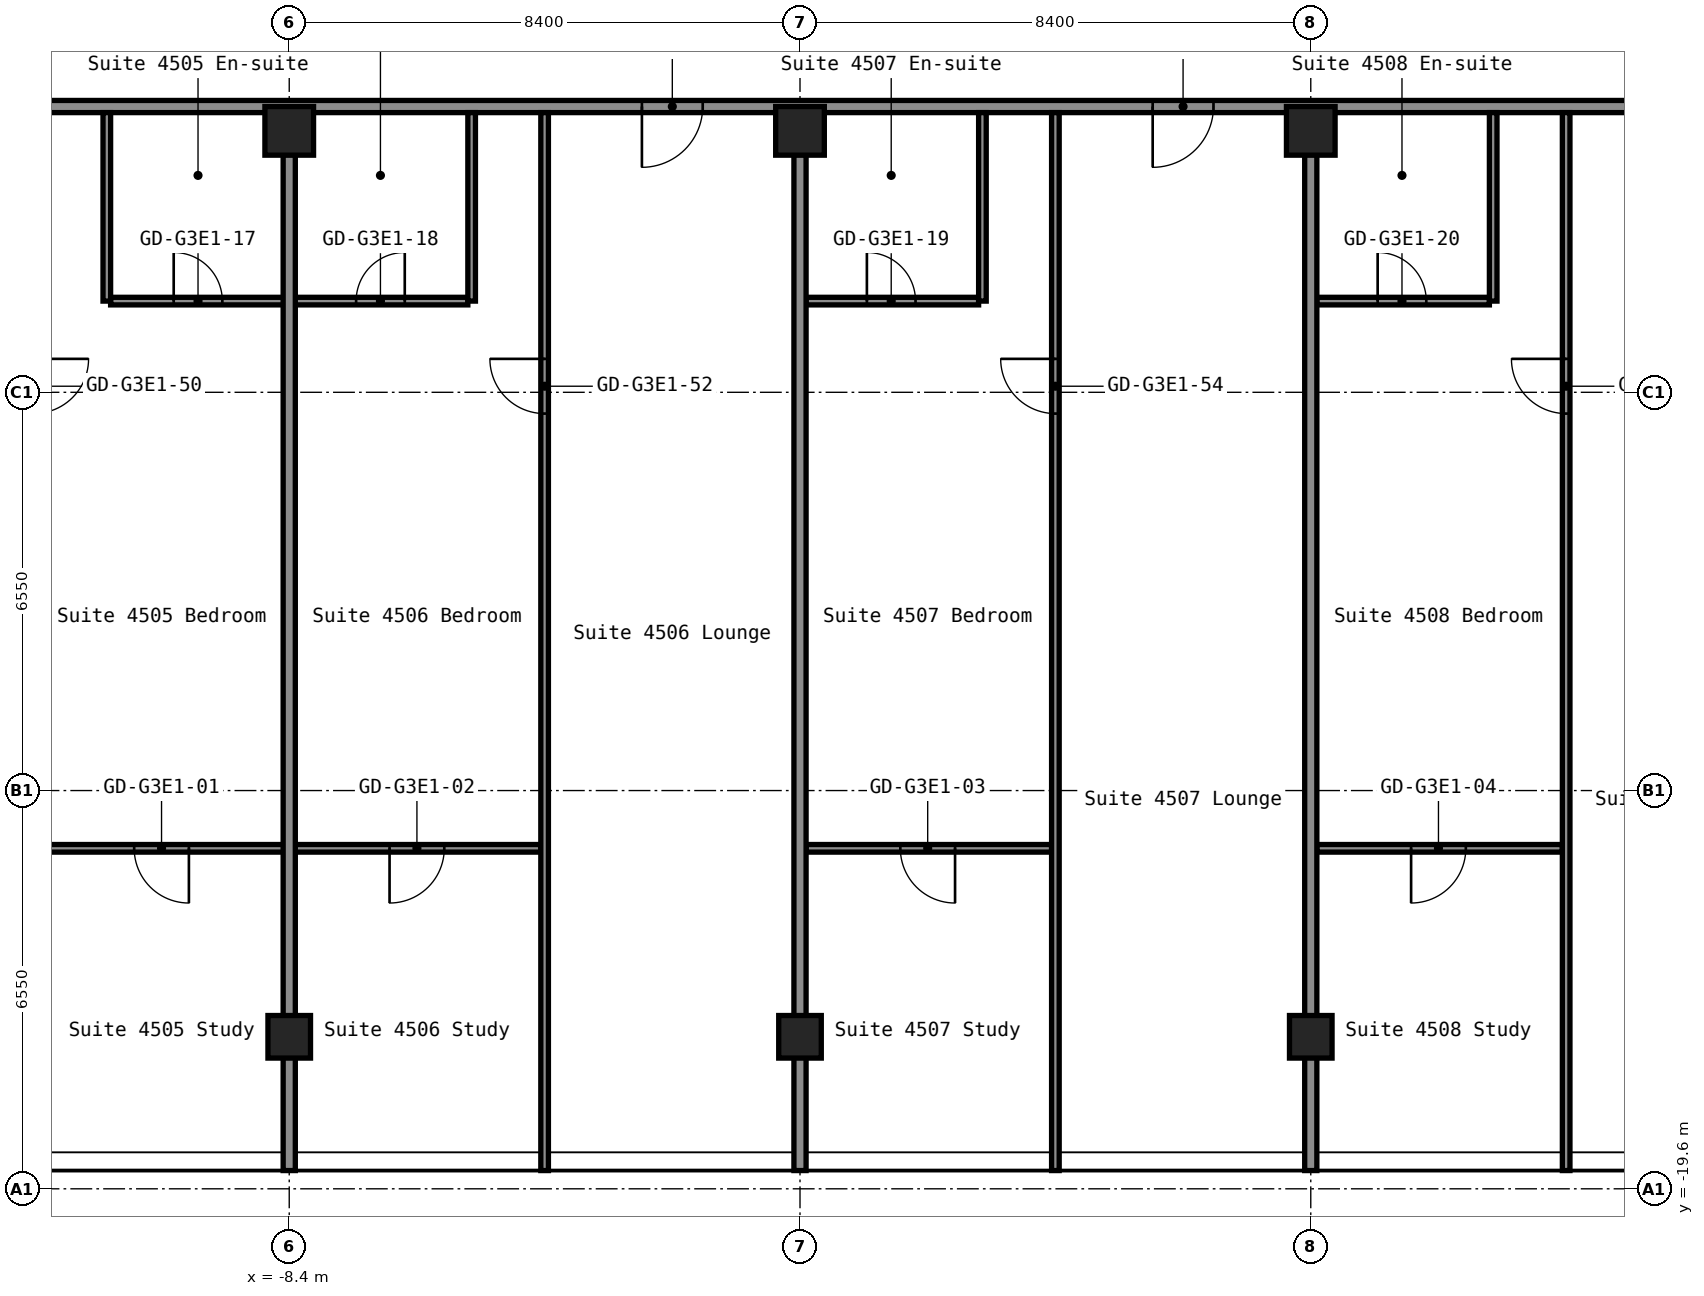
"""IFC4 building model, lengths in metres.
Left out: names, types, materials, properties, quantities, classifications, styles, units other than length and angle.
Written with IfcOpenShell. Run it as: python <this file> out.ifc"""

import sys

from ifc_helpers import new_model, si_unit, direction, frame, frame_2d, origin, origin_2d, place, context, subcontext, project, spatial, rectangle, hollow_rectangle, extrude, element, fill, save


model = new_model("IFC4")
c1 = context("Model", 3, precision=1e-05, world=origin(), true_north=direction((0.0, 1.0)))
c2 = subcontext(c1, "Body", "Model", "MODEL_VIEW")
j1 = project(units=[si_unit("LENGTHUNIT", "METRE"), si_unit("PLANEANGLEUNIT", "RADIAN")], contexts=[c1])
p1 = place(None, origin())
s1 = spatial("IfcSite", under=j1, at=p1, CompositionType="ELEMENT")
p2 = place(p1, origin())
s2 = spatial("IfcBuilding", under=s1, at=p2, CompositionType="ELEMENT")
p3 = place(p2, frame((0.0, 0.0, 159.8)))
s3 = spatial("IfcBuildingStorey", under=s2, at=p3, CompositionType="ELEMENT", Elevation=159.8)
p4 = place(p3, frame((-8.4, -17.1, 0.0), z_axis=(0.0, 0.0, 1.0), x_axis=(1.0, 0.0, 0.0)))
e1 = element("IfcColumn", 1, at=p4, inside=s3, PredefinedType="COLUMN", context=c2, shape_type="SweptSolid", body=[
    extrude(hollow_rectangle(XDim=0.7, YDim=0.7, WallThickness=0.028, at=origin_2d()), origin(), (0.0, 0.0, 1.0), 2.75),
])
p5 = place(p3, frame((-8.4, -2.2, 0.0), z_axis=(0.0, 0.0, 1.0), x_axis=(1.0, 0.0, 0.0)))
e2 = element("IfcColumn", 2, at=p5, inside=s3, PredefinedType="COLUMN", context=c2, shape_type="SweptSolid", body=[
    extrude(hollow_rectangle(XDim=0.8, YDim=0.8, WallThickness=0.032, at=origin_2d()), origin(), (0.0, 0.0, 1.0), 2.75),
])
p6 = place(p3, frame((0.0, -17.1, 0.0), z_axis=(0.0, 0.0, 1.0), x_axis=(1.0, 0.0, 0.0)))
e3 = element("IfcColumn", 3, at=p6, inside=s3, PredefinedType="COLUMN", context=c2, shape_type="SweptSolid", body=[
    extrude(hollow_rectangle(XDim=0.7, YDim=0.7, WallThickness=0.028, at=origin_2d()), origin(), (0.0, 0.0, 1.0), 2.75),
])
p7 = place(p3, frame((0.0, -2.2, 0.0), z_axis=(0.0, 0.0, 1.0), x_axis=(1.0, 0.0, 0.0)))
e4 = element("IfcColumn", 4, at=p7, inside=s3, PredefinedType="COLUMN", context=c2, shape_type="SweptSolid", body=[
    extrude(hollow_rectangle(XDim=0.8, YDim=0.8, WallThickness=0.032, at=origin_2d()), origin(), (0.0, 0.0, 1.0), 2.75),
])
p8 = place(p3, frame((8.4, -17.1, 0.0), z_axis=(0.0, 0.0, 1.0), x_axis=(1.0, 0.0, 0.0)))
e5 = element("IfcColumn", 5, at=p8, inside=s3, PredefinedType="COLUMN", context=c2, shape_type="SweptSolid", body=[
    extrude(hollow_rectangle(XDim=0.7, YDim=0.7, WallThickness=0.028, at=origin_2d()), origin(), (0.0, 0.0, 1.0), 2.75),
])
p9 = place(p3, frame((8.4, -2.2, 0.0), z_axis=(0.0, 0.0, 1.0), x_axis=(1.0, 0.0, 0.0)))
e6 = element("IfcColumn", 6, at=p9, inside=s3, PredefinedType="COLUMN", context=c2, shape_type="SweptSolid", body=[
    extrude(hollow_rectangle(XDim=0.8, YDim=0.8, WallThickness=0.032, at=origin_2d()), origin(), (0.0, 0.0, 1.0), 2.75),
])
p10 = place(p3, frame((-12.538, -14.0, 0.0), z_axis=(0.0, 0.0, 1.0), x_axis=(1.0, 0.0, 0.0)))
e7 = element("IfcWall", 7, at=p10, inside=s3, PredefinedType="PARTITIONING", context=c2, shape_type="SweptSolid", body=[
    extrude(rectangle(XDim=8.275, YDim=0.125, at=frame_2d((4.138, 0.0))), origin(), (0.0, 0.0, 1.0), 2.75),
])
p11 = place(p10, frame((1.587, 0.0, 0.0)))
e8 = element("IfcOpeningElement", 8, at=p11, cuts=e7, PredefinedType="OPENING", context=c2, shape_type="SweptSolid", body=[
    extrude(rectangle(XDim=0.9, YDim=2.1, at=frame_2d((0.45, 1.05))), frame((0.0, 0.073, 0.0), z_axis=(0.0, -1.0, 0.0), x_axis=(1.0, 0.0, 0.0)), (0.0, 0.0, 1.0), 0.145),
])
p12 = place(p10, frame((5.788, 0.0, 0.0)))
e9 = element("IfcOpeningElement", 9, at=p12, cuts=e7, PredefinedType="OPENING", context=c2, shape_type="SweptSolid", body=[
    extrude(rectangle(XDim=0.9, YDim=2.1, at=frame_2d((0.45, 1.05))), frame((0.0, 0.073, 0.0), z_axis=(0.0, -1.0, 0.0), x_axis=(1.0, 0.0, 0.0)), (0.0, 0.0, 1.0), 0.145),
])
p13 = place(p3, frame((0.1, -14.0, 0.0), z_axis=(0.0, 0.0, 1.0), x_axis=(1.0, 0.0, 0.0)))
e10 = element("IfcWall", 10, at=p13, inside=s3, PredefinedType="PARTITIONING", context=c2, shape_type="SweptSolid", body=[
    extrude(rectangle(XDim=4.037, YDim=0.125, at=frame_2d((2.019, 0.0))), origin(), (0.0, 0.0, 1.0), 2.75),
])
p14 = place(p13, frame((1.55, 0.0, 0.0)))
e11 = element("IfcOpeningElement", 11, at=p14, cuts=e10, PredefinedType="OPENING", context=c2, shape_type="SweptSolid", body=[
    extrude(rectangle(XDim=0.9, YDim=2.1, at=frame_2d((0.45, 1.05))), frame((0.0, 0.073, 0.0), z_axis=(0.0, -1.0, 0.0), x_axis=(1.0, 0.0, 0.0)), (0.0, 0.0, 1.0), 0.145),
])
p15 = place(p3, frame((8.5, -14.0, 0.0), z_axis=(0.0, 0.0, 1.0), x_axis=(1.0, 0.0, 0.0)))
e12 = element("IfcWall", 12, at=p15, inside=s3, PredefinedType="PARTITIONING", context=c2, shape_type="SweptSolid", body=[
    extrude(rectangle(XDim=4.038, YDim=0.125, at=frame_2d((2.019, 0.0))), origin(), (0.0, 0.0, 1.0), 2.75),
])
p16 = place(p15, frame((1.55, 0.0, 0.0)))
e13 = element("IfcOpeningElement", 13, at=p16, cuts=e12, PredefinedType="OPENING", context=c2, shape_type="SweptSolid", body=[
    extrude(rectangle(XDim=0.9, YDim=2.1, at=frame_2d((0.45, 1.05))), frame((0.0, 0.073, 0.0), z_axis=(0.0, -1.0, 0.0), x_axis=(1.0, 0.0, 0.0)), (0.0, 0.0, 1.0), 0.145),
])
p17 = place(p3, frame((-11.337, -5.0, 0.0), z_axis=(0.0, 0.0, 1.0), x_axis=(1.0, 0.0, 0.0)))
e14 = element("IfcWall", 14, at=p17, inside=s3, PredefinedType="PARTITIONING", context=c2, shape_type="SweptSolid", body=[
    extrude(rectangle(XDim=5.875, YDim=0.125, at=frame_2d((2.938, 0.0))), origin(), (0.0, 0.0, 1.0), 2.75),
])
p18 = place(p17, frame((1.038, 0.0, 0.0)))
e15 = element("IfcOpeningElement", 15, at=p18, cuts=e14, PredefinedType="OPENING", context=c2, shape_type="SweptSolid", body=[
    extrude(rectangle(XDim=0.8, YDim=2.1, at=frame_2d((0.4, 1.05))), frame((0.0, 0.073, 0.0), z_axis=(0.0, -1.0, 0.0), x_axis=(1.0, 0.0, 0.0)), (0.0, 0.0, 1.0), 0.145),
])
p19 = place(p17, frame((4.038, 0.0, 0.0)))
e16 = element("IfcOpeningElement", 16, at=p19, cuts=e14, PredefinedType="OPENING", context=c2, shape_type="SweptSolid", body=[
    extrude(rectangle(XDim=0.8, YDim=2.1, at=frame_2d((0.4, 1.05))), frame((0.0, 0.073, 0.0), z_axis=(0.0, -1.0, 0.0), x_axis=(1.0, 0.0, 0.0)), (0.0, 0.0, 1.0), 0.145),
])
p20 = place(p3, frame((0.1, -5.0, 0.0), z_axis=(0.0, 0.0, 1.0), x_axis=(1.0, 0.0, 0.0)))
e17 = element("IfcWall", 17, at=p20, inside=s3, PredefinedType="PARTITIONING", context=c2, shape_type="SweptSolid", body=[
    extrude(rectangle(XDim=2.837, YDim=0.125, at=frame_2d((1.419, 0.0))), origin(), (0.0, 0.0, 1.0), 2.75),
])
p21 = place(p20, frame((1.0, 0.0, 0.0)))
e18 = element("IfcOpeningElement", 18, at=p21, cuts=e17, PredefinedType="OPENING", context=c2, shape_type="SweptSolid", body=[
    extrude(rectangle(XDim=0.8, YDim=2.1, at=frame_2d((0.4, 1.05))), frame((0.0, 0.073, 0.0), z_axis=(0.0, -1.0, 0.0), x_axis=(1.0, 0.0, 0.0)), (0.0, 0.0, 1.0), 0.145),
])
p22 = place(p3, frame((8.5, -5.0, 0.0), z_axis=(0.0, 0.0, 1.0), x_axis=(1.0, 0.0, 0.0)))
e19 = element("IfcWall", 19, at=p22, inside=s3, PredefinedType="PARTITIONING", context=c2, shape_type="SweptSolid", body=[
    extrude(rectangle(XDim=2.837, YDim=0.125, at=frame_2d((1.419, 0.0))), origin(), (0.0, 0.0, 1.0), 2.75),
])
p23 = place(p22, frame((1.0, 0.0, 0.0)))
e20 = element("IfcOpeningElement", 20, at=p23, cuts=e19, PredefinedType="OPENING", context=c2, shape_type="SweptSolid", body=[
    extrude(rectangle(XDim=0.8, YDim=2.1, at=frame_2d((0.4, 1.05))), frame((0.0, 0.073, 0.0), z_axis=(0.0, -1.0, 0.0), x_axis=(1.0, 0.0, 0.0)), (0.0, 0.0, 1.0), 0.145),
])
p24 = place(p3, frame((-16.8, -1.8, 0.0), z_axis=(0.0, 0.0, 1.0), x_axis=(1.0, 0.0, 0.0)))
e21 = element("IfcWall", 21, at=p24, inside=s3, PredefinedType="PARTITIONING", context=c2, shape_type="SweptSolid", body=[
    extrude(rectangle(XDim=33.6, YDim=0.2, at=frame_2d((16.8, 0.0))), origin(), (0.0, 0.0, 1.0), 2.75),
])
p25 = place(p24, frame((1.6, 0.0, 0.0)))
e22 = element("IfcOpeningElement", 22, at=p25, cuts=e21, PredefinedType="OPENING", context=c2, shape_type="SweptSolid", body=[
    extrude(rectangle(XDim=1.0, YDim=2.1, at=frame_2d((0.5, 1.05))), frame((0.0, 0.11, 0.0), z_axis=(0.0, -1.0, 0.0), x_axis=(1.0, 0.0, 0.0)), (0.0, 0.0, 1.0), 0.22),
])
p26 = place(p24, frame((14.2, 0.0, 0.0)))
e23 = element("IfcOpeningElement", 23, at=p26, cuts=e21, PredefinedType="OPENING", context=c2, shape_type="SweptSolid", body=[
    extrude(rectangle(XDim=1.0, YDim=2.1, at=frame_2d((0.5, 1.05))), frame((0.0, 0.11, 0.0), z_axis=(0.0, -1.0, 0.0), x_axis=(1.0, 0.0, 0.0)), (0.0, 0.0, 1.0), 0.22),
])
p27 = place(p24, frame((22.6, 0.0, 0.0)))
e24 = element("IfcOpeningElement", 24, at=p27, cuts=e21, PredefinedType="OPENING", context=c2, shape_type="SweptSolid", body=[
    extrude(rectangle(XDim=1.0, YDim=2.1, at=frame_2d((0.5, 1.05))), frame((0.0, 0.11, 0.0), z_axis=(0.0, -1.0, 0.0), x_axis=(1.0, 0.0, 0.0)), (0.0, 0.0, 1.0), 0.22),
])
p28 = place(p24, frame((31.0, 0.0, 0.0)))
e25 = element("IfcOpeningElement", 25, at=p28, cuts=e21, PredefinedType="OPENING", context=c2, shape_type="SweptSolid", body=[
    extrude(rectangle(XDim=1.0, YDim=2.1, at=frame_2d((0.5, 1.05))), frame((0.0, 0.11, 0.0), z_axis=(0.0, -1.0, 0.0), x_axis=(1.0, 0.0, 0.0)), (0.0, 0.0, 1.0), 0.22),
])
p29 = place(p3, frame((-11.4, -5.0, 0.0), z_axis=(0.0, 0.0, 1.0), x_axis=(0.0, 1.0, 0.0)))
e26 = element("IfcWall", 26, at=p29, inside=s3, PredefinedType="PARTITIONING", context=c2, shape_type="SweptSolid", body=[
    extrude(rectangle(XDim=3.1, YDim=0.125, at=frame_2d((1.55, 0.0))), origin(), (0.0, 0.0, 1.0), 2.75),
])
p30 = place(p3, frame((-8.4, -19.3, 0.0), z_axis=(0.0, 0.0, 1.0), x_axis=(0.0, 1.0, 0.0)))
e27 = element("IfcWall", 27, at=p30, inside=s3, PredefinedType="PARTITIONING", context=c2, shape_type="SweptSolid", body=[
    extrude(rectangle(XDim=16.71, YDim=0.2, at=frame_2d((8.355, 0.0))), origin(), (0.0, 0.0, 1.0), 2.75),
])
p31 = place(p3, frame((-5.4, -5.0, 0.0), z_axis=(0.0, 0.0, 1.0), x_axis=(0.0, 1.0, 0.0)))
e28 = element("IfcWall", 28, at=p31, inside=s3, PredefinedType="PARTITIONING", context=c2, shape_type="SweptSolid", body=[
    extrude(rectangle(XDim=3.1, YDim=0.125, at=frame_2d((1.55, 0.0))), origin(), (0.0, 0.0, 1.0), 2.75),
])
p32 = place(p3, frame((-4.2, -19.3, 0.0), z_axis=(0.0, 0.0, 1.0), x_axis=(0.0, 1.0, 0.0)))
e29 = element("IfcWall", 29, at=p32, inside=s3, PredefinedType="PARTITIONING", context=c2, shape_type="SweptSolid", body=[
    extrude(rectangle(XDim=17.4, YDim=0.125, at=frame_2d((8.7, 0.0))), origin(), (0.0, 0.0, 1.0), 2.75),
])
p33 = place(p32, frame((12.45, 0.0, 0.0)))
e30 = element("IfcOpeningElement", 30, at=p33, cuts=e29, PredefinedType="OPENING", context=c2, shape_type="SweptSolid", body=[
    extrude(rectangle(XDim=0.9, YDim=2.1, at=frame_2d((0.45, 1.05))), frame((0.0, 0.073, 0.0), z_axis=(0.0, -1.0, 0.0), x_axis=(1.0, 0.0, 0.0)), (0.0, 0.0, 1.0), 0.145),
])
p34 = place(p3, frame((0.0, -19.3, 0.0), z_axis=(0.0, 0.0, 1.0), x_axis=(0.0, 1.0, 0.0)))
e31 = element("IfcWall", 31, at=p34, inside=s3, PredefinedType="PARTITIONING", context=c2, shape_type="SweptSolid", body=[
    extrude(rectangle(XDim=16.71, YDim=0.2, at=frame_2d((8.355, 0.0))), origin(), (0.0, 0.0, 1.0), 2.75),
])
p35 = place(p3, frame((3.0, -5.0, 0.0), z_axis=(0.0, 0.0, 1.0), x_axis=(0.0, 1.0, 0.0)))
e32 = element("IfcWall", 32, at=p35, inside=s3, PredefinedType="PARTITIONING", context=c2, shape_type="SweptSolid", body=[
    extrude(rectangle(XDim=3.1, YDim=0.125, at=frame_2d((1.55, 0.0))), origin(), (0.0, 0.0, 1.0), 2.75),
])
p36 = place(p3, frame((4.2, -19.3, 0.0), z_axis=(0.0, 0.0, 1.0), x_axis=(0.0, 1.0, 0.0)))
e33 = element("IfcWall", 33, at=p36, inside=s3, PredefinedType="PARTITIONING", context=c2, shape_type="SweptSolid", body=[
    extrude(rectangle(XDim=17.4, YDim=0.125, at=frame_2d((8.7, 0.0))), origin(), (0.0, 0.0, 1.0), 2.75),
])
p37 = place(p36, frame((12.45, 0.0, 0.0)))
e34 = element("IfcOpeningElement", 34, at=p37, cuts=e33, PredefinedType="OPENING", context=c2, shape_type="SweptSolid", body=[
    extrude(rectangle(XDim=0.9, YDim=2.1, at=frame_2d((0.45, 1.05))), frame((0.0, 0.073, 0.0), z_axis=(0.0, -1.0, 0.0), x_axis=(1.0, 0.0, 0.0)), (0.0, 0.0, 1.0), 0.145),
])
p38 = place(p3, frame((8.4, -19.3, 0.0), z_axis=(0.0, 0.0, 1.0), x_axis=(0.0, 1.0, 0.0)))
e35 = element("IfcWall", 35, at=p38, inside=s3, PredefinedType="PARTITIONING", context=c2, shape_type="SweptSolid", body=[
    extrude(rectangle(XDim=16.71, YDim=0.2, at=frame_2d((8.355, 0.0))), origin(), (0.0, 0.0, 1.0), 2.75),
])
p39 = place(p3, frame((11.4, -5.0, 0.0), z_axis=(0.0, 0.0, 1.0), x_axis=(0.0, 1.0, 0.0)))
e36 = element("IfcWall", 36, at=p39, inside=s3, PredefinedType="PARTITIONING", context=c2, shape_type="SweptSolid", body=[
    extrude(rectangle(XDim=3.1, YDim=0.125, at=frame_2d((1.55, 0.0))), origin(), (0.0, 0.0, 1.0), 2.75),
])
p40 = place(p3, frame((12.6, -19.3, 0.0), z_axis=(0.0, 0.0, 1.0), x_axis=(0.0, 1.0, 0.0)))
e37 = element("IfcWall", 37, at=p40, inside=s3, PredefinedType="PARTITIONING", context=c2, shape_type="SweptSolid", body=[
    extrude(rectangle(XDim=17.4, YDim=0.125, at=frame_2d((8.7, 0.0))), origin(), (0.0, 0.0, 1.0), 2.75),
])
p41 = place(p40, frame((12.45, 0.0, 0.0)))
e38 = element("IfcOpeningElement", 38, at=p41, cuts=e37, PredefinedType="OPENING", context=c2, shape_type="SweptSolid", body=[
    extrude(rectangle(XDim=0.9, YDim=2.1, at=frame_2d((0.45, 1.05))), frame((0.0, 0.073, 0.0), z_axis=(0.0, -1.0, 0.0), x_axis=(1.0, 0.0, 0.0)), (0.0, 0.0, 1.0), 0.145),
])
p42 = place(p11, origin())
e39 = element("IfcDoor", 39, at=p42, inside=s3, OperationType="SINGLE_SWING_RIGHT", PredefinedType="DOOR", context=c2, shape_type="SweptSolid", body=[
    extrude(rectangle(XDim=0.9, YDim=2.1, at=frame_2d((0.45, 1.05))), frame((0.0, 0.025, 0.0), z_axis=(0.0, -1.0, 0.0), x_axis=(1.0, 0.0, 0.0)), (0.0, 0.0, 1.0), 0.05),
])
fill(e8, e39)
p43 = place(p12, origin())
e40 = element("IfcDoor", 40, at=p43, inside=s3, OperationType="SINGLE_SWING_LEFT", PredefinedType="DOOR", context=c2, shape_type="SweptSolid", body=[
    extrude(rectangle(XDim=0.9, YDim=2.1, at=frame_2d((0.45, 1.05))), frame((0.0, 0.025, 0.0), z_axis=(0.0, -1.0, 0.0), x_axis=(1.0, 0.0, 0.0)), (0.0, 0.0, 1.0), 0.05),
])
fill(e9, e40)
p44 = place(p14, origin())
e41 = element("IfcDoor", 41, at=p44, inside=s3, OperationType="SINGLE_SWING_RIGHT", PredefinedType="DOOR", context=c2, shape_type="SweptSolid", body=[
    extrude(rectangle(XDim=0.9, YDim=2.1, at=frame_2d((0.45, 1.05))), frame((0.0, 0.025, 0.0), z_axis=(0.0, -1.0, 0.0), x_axis=(1.0, 0.0, 0.0)), (0.0, 0.0, 1.0), 0.05),
])
fill(e11, e41)
p45 = place(p16, origin())
e42 = element("IfcDoor", 42, at=p45, inside=s3, OperationType="SINGLE_SWING_LEFT", PredefinedType="DOOR", context=c2, shape_type="SweptSolid", body=[
    extrude(rectangle(XDim=0.9, YDim=2.1, at=frame_2d((0.45, 1.05))), frame((0.0, 0.025, 0.0), z_axis=(0.0, -1.0, 0.0), x_axis=(1.0, 0.0, 0.0)), (0.0, 0.0, 1.0), 0.05),
])
fill(e13, e42)
p46 = place(p18, origin())
e43 = element("IfcDoor", 43, at=p46, inside=s3, OperationType="SINGLE_SWING_RIGHT", PredefinedType="DOOR", context=c2, shape_type="SweptSolid", body=[
    extrude(rectangle(XDim=0.8, YDim=2.1, at=frame_2d((0.4, 1.05))), frame((0.0, 0.025, 0.0), z_axis=(0.0, -1.0, 0.0), x_axis=(1.0, 0.0, 0.0)), (0.0, 0.0, 1.0), 0.05),
])
fill(e15, e43)
p47 = place(p19, origin())
e44 = element("IfcDoor", 44, at=p47, inside=s3, OperationType="SINGLE_SWING_LEFT", PredefinedType="DOOR", context=c2, shape_type="SweptSolid", body=[
    extrude(rectangle(XDim=0.8, YDim=2.1, at=frame_2d((0.4, 1.05))), frame((0.0, 0.025, 0.0), z_axis=(0.0, -1.0, 0.0), x_axis=(1.0, 0.0, 0.0)), (0.0, 0.0, 1.0), 0.05),
])
fill(e16, e44)
p48 = place(p21, origin())
e45 = element("IfcDoor", 45, at=p48, inside=s3, OperationType="SINGLE_SWING_RIGHT", PredefinedType="DOOR", context=c2, shape_type="SweptSolid", body=[
    extrude(rectangle(XDim=0.8, YDim=2.1, at=frame_2d((0.4, 1.05))), frame((0.0, 0.025, 0.0), z_axis=(0.0, -1.0, 0.0), x_axis=(1.0, 0.0, 0.0)), (0.0, 0.0, 1.0), 0.05),
])
fill(e18, e45)
p49 = place(p23, origin())
e46 = element("IfcDoor", 46, at=p49, inside=s3, OperationType="SINGLE_SWING_RIGHT", PredefinedType="DOOR", context=c2, shape_type="SweptSolid", body=[
    extrude(rectangle(XDim=0.8, YDim=2.1, at=frame_2d((0.4, 1.05))), frame((0.0, 0.025, 0.0), z_axis=(0.0, -1.0, 0.0), x_axis=(1.0, 0.0, 0.0)), (0.0, 0.0, 1.0), 0.05),
])
fill(e20, e46)
p50 = place(p26, origin())
e47 = element("IfcDoor", 47, at=p50, inside=s3, OperationType="SINGLE_SWING_LEFT", PredefinedType="DOOR", context=c2, shape_type="SweptSolid", body=[
    extrude(rectangle(XDim=1.0, YDim=2.1, at=frame_2d((0.5, 1.05))), frame((0.0, 0.025, 0.0), z_axis=(0.0, -1.0, 0.0), x_axis=(1.0, 0.0, 0.0)), (0.0, 0.0, 1.0), 0.05),
])
fill(e23, e47)
p51 = place(p27, origin())
e48 = element("IfcDoor", 48, at=p51, inside=s3, OperationType="SINGLE_SWING_LEFT", PredefinedType="DOOR", context=c2, shape_type="SweptSolid", body=[
    extrude(rectangle(XDim=1.0, YDim=2.1, at=frame_2d((0.5, 1.05))), frame((0.0, 0.025, 0.0), z_axis=(0.0, -1.0, 0.0), x_axis=(1.0, 0.0, 0.0)), (0.0, 0.0, 1.0), 0.05),
])
fill(e24, e48)
p52 = place(p33, origin())
e49 = element("IfcDoor", 49, at=p52, inside=s3, OperationType="SINGLE_SWING_LEFT", PredefinedType="DOOR", context=c2, shape_type="SweptSolid", body=[
    extrude(rectangle(XDim=0.9, YDim=2.1, at=frame_2d((0.45, 1.05))), frame((0.0, 0.025, 0.0), z_axis=(0.0, -1.0, 0.0), x_axis=(1.0, 0.0, 0.0)), (0.0, 0.0, 1.0), 0.05),
])
fill(e30, e49)
p53 = place(p37, origin())
e50 = element("IfcDoor", 50, at=p53, inside=s3, OperationType="SINGLE_SWING_LEFT", PredefinedType="DOOR", context=c2, shape_type="SweptSolid", body=[
    extrude(rectangle(XDim=0.9, YDim=2.1, at=frame_2d((0.45, 1.05))), frame((0.0, 0.025, 0.0), z_axis=(0.0, -1.0, 0.0), x_axis=(1.0, 0.0, 0.0)), (0.0, 0.0, 1.0), 0.05),
])
fill(e34, e50)
p54 = place(p41, origin())
e51 = element("IfcDoor", 51, at=p54, inside=s3, OperationType="SINGLE_SWING_LEFT", PredefinedType="DOOR", context=c2, shape_type="SweptSolid", body=[
    extrude(rectangle(XDim=0.9, YDim=2.1, at=frame_2d((0.45, 1.05))), frame((0.0, 0.025, 0.0), z_axis=(0.0, -1.0, 0.0), x_axis=(1.0, 0.0, 0.0)), (0.0, 0.0, 1.0), 0.05),
])
fill(e38, e51)
save(model, sys.argv[1])
